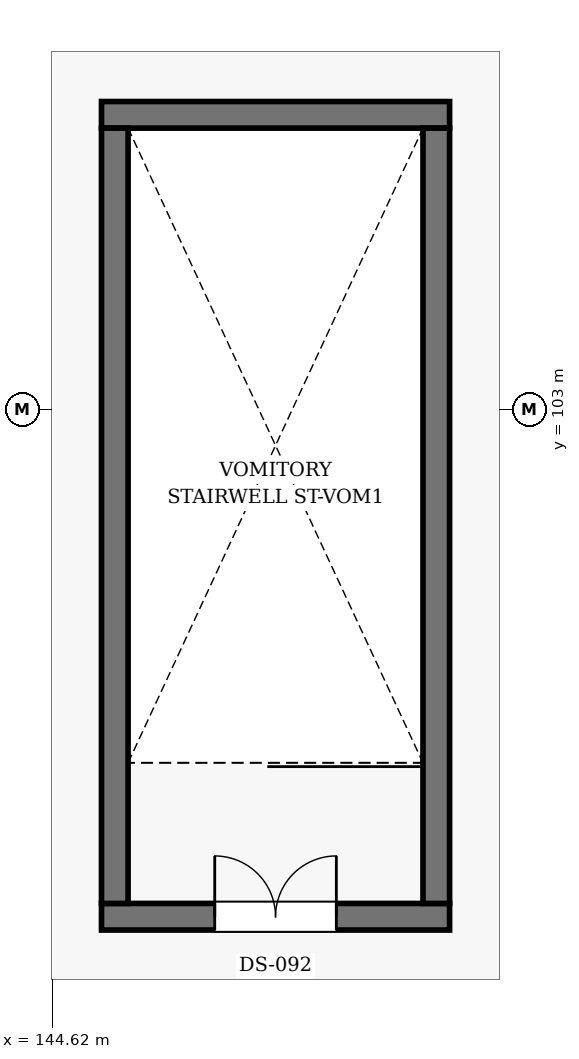
"""IFC4 building model, lengths in metres.
Left out: names, types, materials, properties, quantities, classifications, styles, units other than length and angle.
Written with IfcOpenShell. Run it as: python <this file> out.ifc"""

import sys

from ifc_helpers import new_model, si_unit, direction, frame, frame_2d, origin, place, context, subcontext, project, spatial, rectangle, extrude, element, fill, save


model = new_model("IFC4")
c1 = context("Model", 3, precision=1e-05, world=origin(), true_north=direction((0.0, 1.0)))
c2 = subcontext(c1, "Body", "Model", "MODEL_VIEW")
j1 = project(units=[si_unit("LENGTHUNIT", "METRE"), si_unit("PLANEANGLEUNIT", "RADIAN")], contexts=[c1])
p1 = place(None, origin())
s1 = spatial("IfcSite", under=j1, at=p1, CompositionType="ELEMENT")
p2 = place(p1, origin())
s2 = spatial("IfcBuilding", under=s1, at=p2, CompositionType="ELEMENT")
p3 = place(p2, frame((0.0, 0.0, 5.4)))
s3 = spatial("IfcBuildingStorey", under=s2, at=p3, CompositionType="ELEMENT", Elevation=5.4)
p4 = place(p3, frame((145.27, 96.325, 0.0), z_axis=(0.0, 0.0, 1.0), x_axis=(1.0, 0.0, 0.0)))
e1 = element("IfcWall", 1, at=p4, inside=s3, PredefinedType="SHEAR", context=c2, shape_type="SweptSolid", body=[
    extrude(rectangle(XDim=4.58, YDim=0.35, at=frame_2d((2.29, 0.0))), origin(), (0.0, 0.0, 1.0), 5.4),
])
p5 = place(p4, frame((1.49, 0.0, 0.0)))
e2 = element("IfcOpeningElement", 2, at=p5, cuts=e1, PredefinedType="OPENING", context=c2, shape_type="SweptSolid", body=[
    extrude(rectangle(XDim=1.6, YDim=2.2, at=frame_2d((0.8, 1.1))), frame((0.0, 0.185, 0.0), z_axis=(0.0, -1.0, 0.0), x_axis=(1.0, 0.0, 0.0)), (0.0, 0.0, 1.0), 0.37),
])
p6 = place(p3, frame((149.85, 106.875, 0.0), z_axis=(0.0, 0.0, 1.0), x_axis=(-1.0, 0.0, 0.0)))
e3 = element("IfcWall", 3, at=p6, inside=s3, PredefinedType="SHEAR", context=c2, shape_type="SweptSolid", body=[
    extrude(rectangle(XDim=4.58, YDim=0.35, at=frame_2d((2.29, 0.0))), origin(), (0.0, 0.0, 1.0), 5.4),
])
for number, where, z_axis, x_axis in (
    (4, (145.445, 106.7, 0.0), (0.0, 0.0, 1.0), (0.0, -1.0, 0.0)),
    (5, (149.675, 96.5, 0.0), (0.0, 0.0, 1.0), (0.0, 1.0, 0.0)),
):
    element("IfcWall", number, at=place(p3, frame(where, z_axis=z_axis, x_axis=x_axis)), inside=s3, PredefinedType="SHEAR", context=c2, shape_type="SweptSolid", body=[
        extrude(rectangle(XDim=10.2, YDim=0.35, at=frame_2d((5.1, 0.0))), origin(), (0.0, 0.0, 1.0), 5.4),
    ])
p7 = place(p5, origin())
e6 = element("IfcDoor", 6, at=p7, inside=s3, OperationType="DOUBLE_DOOR_SINGLE_SWING", PredefinedType="DOOR", context=c2, shape_type="SweptSolid", body=[
    extrude(rectangle(XDim=1.6, YDim=2.2, at=frame_2d((0.8, 1.1))), frame((0.0, 0.025, 0.0), z_axis=(0.0, -1.0, 0.0), x_axis=(1.0, 0.0, 0.0)), (0.0, 0.0, 1.0), 0.05),
])
fill(e2, e6)
save(model, sys.argv[1])
